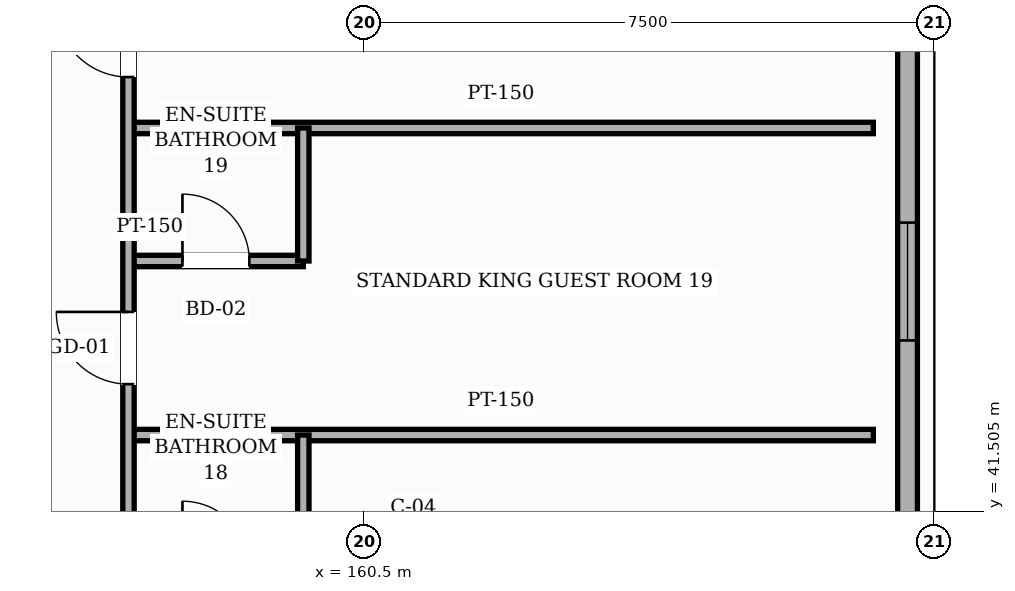
"""IFC4 building model, lengths in metres.
Left out: names, types, materials, properties, quantities, classifications, styles, units other than length and angle.
Written with IfcOpenShell. Run it as: python <this file> out.ifc"""

import sys

from ifc_helpers import new_model, si_unit, direction, frame, frame_2d, origin, place, context, subcontext, project, spatial, rectangle, extrude, element, fill, save


model = new_model("IFC4")
c1 = context("Model", 3, precision=1e-05, world=origin(), true_north=direction((0.0, 1.0)))
c2 = subcontext(c1, "Body", "Model", "MODEL_VIEW")
j1 = project(units=[si_unit("LENGTHUNIT", "METRE"), si_unit("PLANEANGLEUNIT", "RADIAN")], contexts=[c1])
p1 = place(None, origin())
s1 = spatial("IfcSite", under=j1, at=p1, CompositionType="ELEMENT")
p2 = place(p1, origin())
s2 = spatial("IfcBuilding", under=s1, at=p2, CompositionType="ELEMENT")
p3 = place(p2, frame((0.0, 0.0, 15.0)))
s3 = spatial("IfcBuildingStorey", under=s2, at=p3, CompositionType="ELEMENT", Elevation=15.0)
p4 = place(p3, frame((167.65, 48.125, 0.0), z_axis=(0.0, 0.0, 1.0), x_axis=(0.0, -1.0, 0.0)))
e1 = element("IfcWall", 1, at=p4, inside=s3, PredefinedType="SOLIDWALL", context=c2, shape_type="SweptSolid", body=[
    extrude(rectangle(XDim=6.9, YDim=0.26, at=frame_2d((3.45, 0.0))), origin(), (0.0, 0.0, 1.0), 3.885),
])
p5 = place(p4, frame((2.82, 0.0, 0.85)))
e2 = element("IfcOpeningElement", 2, at=p5, cuts=e1, PredefinedType="OPENING", context=c2, shape_type="SweptSolid", body=[
    extrude(rectangle(XDim=1.55, YDim=1.35, at=frame_2d((0.775, 0.675))), frame((0.0, 0.14, 0.0), z_axis=(0.0, -1.0, 0.0), x_axis=(1.0, 0.0, 0.0)), (0.0, 0.0, 1.0), 0.28),
])
p6 = place(p3, frame((157.4, 42.51, 0.0), z_axis=(0.0, 0.0, 1.0), x_axis=(1.0, 0.0, 0.0)))
e3 = element("IfcWall", 3, at=p6, inside=s3, PredefinedType="PARTITIONING", context=c2, shape_type="SweptSolid", body=[
    extrude(rectangle(XDim=9.8, YDim=0.15, at=frame_2d((4.9, 0.0))), origin(), (0.0, 0.0, 1.0), 4.545),
])
p7 = place(p3, frame((157.4, 44.8, 0.0), z_axis=(0.0, 0.0, 1.0), x_axis=(1.0, 0.0, 0.0)))
e4 = element("IfcWall", 4, at=p7, inside=s3, PredefinedType="PARTITIONING", context=c2, shape_type="SweptSolid", body=[
    extrude(rectangle(XDim=2.3, YDim=0.15, at=frame_2d((1.15, 0.0))), origin(), (0.0, 0.0, 1.0), 4.545),
])
p8 = place(p7, frame((0.71, 0.0, 0.0)))
e5 = element("IfcOpeningElement", 5, at=p8, cuts=e4, PredefinedType="OPENING", context=c2, shape_type="SweptSolid", body=[
    extrude(rectangle(XDim=0.88, YDim=2.12, at=frame_2d((0.44, 1.06))), frame((0.0, 0.085, 0.0), z_axis=(0.0, -1.0, 0.0), x_axis=(1.0, 0.0, 0.0)), (0.0, 0.0, 1.0), 0.17),
])
p9 = place(p3, frame((157.4, 46.55, 0.0), z_axis=(0.0, 0.0, 1.0), x_axis=(1.0, 0.0, 0.0)))
e6 = element("IfcWall", 6, at=p9, inside=s3, PredefinedType="PARTITIONING", context=c2, shape_type="SweptSolid", body=[
    extrude(rectangle(XDim=9.8, YDim=0.15, at=frame_2d((4.9, 0.0))), origin(), (0.0, 0.0, 1.0), 4.545),
])
p10 = place(p3, frame((157.4, 22.3, 0.0), z_axis=(0.0, 0.0, 1.0), x_axis=(0.0, 1.0, 0.0)))
e7 = element("IfcWall", 7, at=p10, inside=s3, PredefinedType="PARTITIONING", context=c2, shape_type="SweptSolid", body=[
    extrude(rectangle(XDim=48.5, YDim=0.15, at=frame_2d((24.25, 0.0))), origin(), (0.0, 0.0, 1.0), 4.545),
])
p11 = place(p10, frame((0.67, 0.0, 0.0)))
e8 = element("IfcOpeningElement", 8, at=p11, cuts=e7, PredefinedType="OPENING", context=c2, shape_type="SweptSolid", body=[
    extrude(rectangle(XDim=0.95, YDim=2.15, at=frame_2d((0.475, 1.075))), frame((0.0, 0.085, 0.0), z_axis=(0.0, -1.0, 0.0), x_axis=(1.0, 0.0, 0.0)), (0.0, 0.0, 1.0), 0.17),
])
p12 = place(p10, frame((4.71, 0.0, 0.0)))
e9 = element("IfcOpeningElement", 9, at=p12, cuts=e7, PredefinedType="OPENING", context=c2, shape_type="SweptSolid", body=[
    extrude(rectangle(XDim=0.95, YDim=2.15, at=frame_2d((0.475, 1.075))), frame((0.0, 0.085, 0.0), z_axis=(0.0, -1.0, 0.0), x_axis=(1.0, 0.0, 0.0)), (0.0, 0.0, 1.0), 0.17),
])
p13 = place(p10, frame((8.755, 0.0, 0.0)))
e10 = element("IfcOpeningElement", 10, at=p13, cuts=e7, PredefinedType="OPENING", context=c2, shape_type="SweptSolid", body=[
    extrude(rectangle(XDim=0.95, YDim=2.15, at=frame_2d((0.475, 1.075))), frame((0.0, 0.085, 0.0), z_axis=(0.0, -1.0, 0.0), x_axis=(1.0, 0.0, 0.0)), (0.0, 0.0, 1.0), 0.17),
])
p14 = place(p10, frame((12.795, 0.0, 0.0)))
e11 = element("IfcOpeningElement", 11, at=p14, cuts=e7, PredefinedType="OPENING", context=c2, shape_type="SweptSolid", body=[
    extrude(rectangle(XDim=0.95, YDim=2.15, at=frame_2d((0.475, 1.075))), frame((0.0, 0.085, 0.0), z_axis=(0.0, -1.0, 0.0), x_axis=(1.0, 0.0, 0.0)), (0.0, 0.0, 1.0), 0.17),
])
p15 = place(p10, frame((16.835, 0.0, 0.0)))
e12 = element("IfcOpeningElement", 12, at=p15, cuts=e7, PredefinedType="OPENING", context=c2, shape_type="SweptSolid", body=[
    extrude(rectangle(XDim=0.95, YDim=2.15, at=frame_2d((0.475, 1.075))), frame((0.0, 0.085, 0.0), z_axis=(0.0, -1.0, 0.0), x_axis=(1.0, 0.0, 0.0)), (0.0, 0.0, 1.0), 0.17),
])
p16 = place(p10, frame((20.88, 0.0, 0.0)))
e13 = element("IfcOpeningElement", 13, at=p16, cuts=e7, PredefinedType="OPENING", context=c2, shape_type="SweptSolid", body=[
    extrude(rectangle(XDim=0.95, YDim=2.15, at=frame_2d((0.475, 1.075))), frame((0.0, 0.085, 0.0), z_axis=(0.0, -1.0, 0.0), x_axis=(1.0, 0.0, 0.0)), (0.0, 0.0, 1.0), 0.17),
])
p17 = place(p10, frame((24.92, 0.0, 0.0)))
e14 = element("IfcOpeningElement", 14, at=p17, cuts=e7, PredefinedType="OPENING", context=c2, shape_type="SweptSolid", body=[
    extrude(rectangle(XDim=0.95, YDim=2.15, at=frame_2d((0.475, 1.075))), frame((0.0, 0.085, 0.0), z_axis=(0.0, -1.0, 0.0), x_axis=(1.0, 0.0, 0.0)), (0.0, 0.0, 1.0), 0.17),
])
p18 = place(p10, frame((28.96, 0.0, 0.0)))
e15 = element("IfcOpeningElement", 15, at=p18, cuts=e7, PredefinedType="OPENING", context=c2, shape_type="SweptSolid", body=[
    extrude(rectangle(XDim=0.95, YDim=2.15, at=frame_2d((0.475, 1.075))), frame((0.0, 0.085, 0.0), z_axis=(0.0, -1.0, 0.0), x_axis=(1.0, 0.0, 0.0)), (0.0, 0.0, 1.0), 0.17),
])
p19 = place(p10, frame((33.005, 0.0, 0.0)))
e16 = element("IfcOpeningElement", 16, at=p19, cuts=e7, PredefinedType="OPENING", context=c2, shape_type="SweptSolid", body=[
    extrude(rectangle(XDim=0.95, YDim=2.15, at=frame_2d((0.475, 1.075))), frame((0.0, 0.085, 0.0), z_axis=(0.0, -1.0, 0.0), x_axis=(1.0, 0.0, 0.0)), (0.0, 0.0, 1.0), 0.17),
])
p20 = place(p10, frame((37.045, 0.0, 0.0)))
e17 = element("IfcOpeningElement", 17, at=p20, cuts=e7, PredefinedType="OPENING", context=c2, shape_type="SweptSolid", body=[
    extrude(rectangle(XDim=0.95, YDim=2.15, at=frame_2d((0.475, 1.075))), frame((0.0, 0.085, 0.0), z_axis=(0.0, -1.0, 0.0), x_axis=(1.0, 0.0, 0.0)), (0.0, 0.0, 1.0), 0.17),
])
p21 = place(p10, frame((41.09, 0.0, 0.0)))
e18 = element("IfcOpeningElement", 18, at=p21, cuts=e7, PredefinedType="OPENING", context=c2, shape_type="SweptSolid", body=[
    extrude(rectangle(XDim=0.95, YDim=2.15, at=frame_2d((0.475, 1.075))), frame((0.0, 0.085, 0.0), z_axis=(0.0, -1.0, 0.0), x_axis=(1.0, 0.0, 0.0)), (0.0, 0.0, 1.0), 0.17),
])
p22 = place(p10, frame((45.13, 0.0, 0.0)))
e19 = element("IfcOpeningElement", 19, at=p22, cuts=e7, PredefinedType="OPENING", context=c2, shape_type="SweptSolid", body=[
    extrude(rectangle(XDim=0.95, YDim=2.15, at=frame_2d((0.475, 1.075))), frame((0.0, 0.085, 0.0), z_axis=(0.0, -1.0, 0.0), x_axis=(1.0, 0.0, 0.0)), (0.0, 0.0, 1.0), 0.17),
])
for number, where, z_axis, x_axis in (
    (20, (159.7, 40.76, 0.0), (0.0, 0.0, 1.0), (0.0, 1.0, 0.0)),
    (21, (159.7, 44.8, 0.0), (0.0, 0.0, 1.0), (0.0, 1.0, 0.0)),
):
    element("IfcWall", number, at=place(p3, frame(where, z_axis=z_axis, x_axis=x_axis)), inside=s3, PredefinedType="PARTITIONING", context=c2, shape_type="SweptSolid", body=[
        extrude(rectangle(XDim=1.75, YDim=0.15, at=frame_2d((0.875, 0.0))), origin(), (0.0, 0.0, 1.0), 4.545),
    ])
p23 = place(p5, origin())
e22 = element("IfcWindow", 22, at=p23, inside=s3, PartitioningType="SINGLE_PANEL", PredefinedType="WINDOW", context=c2, shape_type="SweptSolid", body=[
    extrude(rectangle(XDim=1.55, YDim=1.35, at=frame_2d((0.775, 0.675))), frame((0.0, 0.03, 0.0), z_axis=(0.0, -1.0, 0.0), x_axis=(1.0, 0.0, 0.0)), (0.0, 0.0, 1.0), 0.06),
])
fill(e2, e22)
p24 = place(p16, origin())
e23 = element("IfcDoor", 23, at=p24, inside=s3, OperationType="SINGLE_SWING_RIGHT", PredefinedType="DOOR", context=c2, shape_type="SweptSolid", body=[
    extrude(rectangle(XDim=0.95, YDim=2.15, at=frame_2d((0.475, 1.075))), frame((0.0, 0.025, 0.0), z_axis=(0.0, -1.0, 0.0), x_axis=(1.0, 0.0, 0.0)), (0.0, 0.0, 1.0), 0.05),
])
fill(e13, e23)
p25 = place(p8, origin())
e24 = element("IfcDoor", 24, at=p25, inside=s3, OperationType="SINGLE_SWING_LEFT", PredefinedType="DOOR", context=c2, shape_type="SweptSolid", body=[
    extrude(rectangle(XDim=0.88, YDim=2.12, at=frame_2d((0.44, 1.06))), frame((0.0, 0.025, 0.0), z_axis=(0.0, -1.0, 0.0), x_axis=(1.0, 0.0, 0.0)), (0.0, 0.0, 1.0), 0.05),
])
fill(e5, e24)
p26 = place(p17, origin())
e25 = element("IfcDoor", 25, at=p26, inside=s3, OperationType="SINGLE_SWING_RIGHT", PredefinedType="DOOR", context=c2, shape_type="SweptSolid", body=[
    extrude(rectangle(XDim=0.95, YDim=2.15, at=frame_2d((0.475, 1.075))), frame((0.0, 0.025, 0.0), z_axis=(0.0, -1.0, 0.0), x_axis=(1.0, 0.0, 0.0)), (0.0, 0.0, 1.0), 0.05),
])
fill(e14, e25)
save(model, sys.argv[1])
